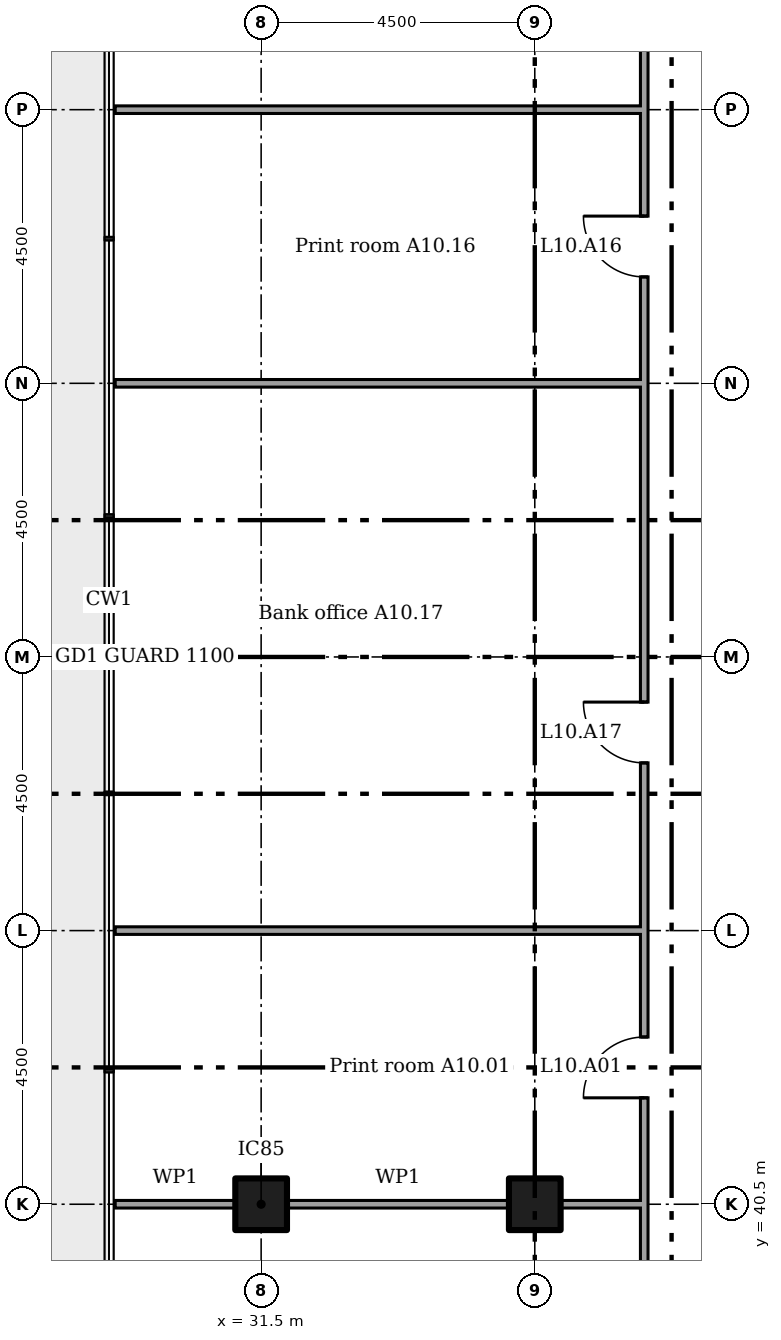
"""IFC4 building model, lengths in metres.
Left out: names, types, materials, properties, quantities, classifications, styles, units other than length and angle.
Written with IfcOpenShell. Run it as: python <this file> out.ifc"""

import sys

from ifc_helpers import new_model, si_unit, direction, frame, frame_2d, origin, origin_2d, place, context, subcontext, project, spatial, rectangle, extrude, element, fill, save


model = new_model("IFC4")
c1 = context("Model", 3, precision=1e-05, world=origin(), true_north=direction((0.0, 1.0)))
c2 = subcontext(c1, "Body", "Model", "MODEL_VIEW")
j1 = project(units=[si_unit("LENGTHUNIT", "METRE"), si_unit("PLANEANGLEUNIT", "RADIAN")], contexts=[c1])
p1 = place(None, origin())
s1 = spatial("IfcSite", under=j1, at=p1, CompositionType="ELEMENT")
p2 = place(p1, origin())
s2 = spatial("IfcBuilding", under=s1, at=p2, CompositionType="ELEMENT")
p3 = place(p2, frame((0.0, 0.0, 47.4)))
s3 = spatial("IfcBuildingStorey", under=s2, at=p3, CompositionType="ELEMENT", Elevation=47.4)
for number, where in (
    (1, (31.5, 40.5, 0.0)),
    (2, (36.0, 40.5, 0.0)),
):
    element("IfcColumn", number, at=place(p3, frame(where)), inside=s3, PredefinedType="COLUMN", context=c2, shape_type="SweptSolid", body=[
        extrude(rectangle(XDim=0.85, YDim=0.85, at=origin_2d()), origin(), (0.0, 0.0, 1.0), 3.6),
    ])
p4 = place(p3, frame((29.1, 40.5, 0.0)))
e3 = element("IfcWall", 3, at=p4, inside=s3, PredefinedType="PARTITIONING", context=c2, shape_type="SweptSolid", body=[
    extrude(rectangle(XDim=1.975, YDim=0.125, at=frame_2d((0.987, 0.0))), origin(), (0.0, 0.0, 1.0), 2.676),
])
p5 = place(p3, frame((31.925, 40.5, 0.0)))
e4 = element("IfcWall", 4, at=p5, inside=s3, PredefinedType="PARTITIONING", context=c2, shape_type="SweptSolid", body=[
    extrude(rectangle(XDim=3.65, YDim=0.125, at=frame_2d((1.825, 0.0))), origin(), (0.0, 0.0, 1.0), 2.676),
])
p6 = place(p3, frame((36.425, 40.5, 0.0)))
e5 = element("IfcWall", 5, at=p6, inside=s3, PredefinedType="PARTITIONING", context=c2, shape_type="SweptSolid", body=[
    extrude(rectangle(XDim=1.375, YDim=0.125, at=frame_2d((0.688, 0.0))), origin(), (0.0, 0.0, 1.0), 2.676),
])
for number, where in (
    (6, (29.1, 45.0, 0.0)),
    (7, (29.1, 54.0, 0.0)),
    (8, (29.1, 58.5, 0.0)),
):
    element("IfcWall", number, at=place(p3, frame(where)), inside=s3, PredefinedType="PARTITIONING", context=c2, shape_type="SweptSolid", body=[
        extrude(rectangle(XDim=8.7, YDim=0.125, at=frame_2d((4.35, 0.0))), origin(), (0.0, 0.0, 1.0), 2.766),
    ])
p7 = place(p3, frame((37.8, 38.462, 0.0), z_axis=(0.0, 0.0, 1.0), x_axis=(0.0, 1.0, 0.0)))
e9 = element("IfcWall", 9, at=p7, inside=s3, PredefinedType="PARTITIONING", context=c2, shape_type="SweptSolid", body=[
    extrude(rectangle(XDim=22.075, YDim=0.125, at=frame_2d((11.038, 0.0))), origin(), (0.0, 0.0, 1.0), 3.45),
])
p8 = place(p7, frame((3.788, 0.0, 0.0)))
e10 = element("IfcOpeningElement", 10, at=p8, cuts=e9, PredefinedType="OPENING", context=c2, shape_type="SweptSolid", body=[
    extrude(rectangle(XDim=1.0, YDim=2.1, at=frame_2d((0.5, 1.05))), frame((0.0, 0.073, 0.0), z_axis=(0.0, -1.0, 0.0), x_axis=(1.0, 0.0, 0.0)), (0.0, 0.0, 1.0), 0.145),
])
p9 = place(p7, frame((17.288, 0.0, 0.0)))
e11 = element("IfcOpeningElement", 11, at=p9, cuts=e9, PredefinedType="OPENING", context=c2, shape_type="SweptSolid", body=[
    extrude(rectangle(XDim=1.0, YDim=2.1, at=frame_2d((0.5, 1.05))), frame((0.0, 0.073, 0.0), z_axis=(0.0, -1.0, 0.0), x_axis=(1.0, 0.0, 0.0)), (0.0, 0.0, 1.0), 0.145),
])
p10 = place(p7, frame((9.295, 0.0, 0.0)))
e12 = element("IfcOpeningElement", 12, at=p10, cuts=e9, PredefinedType="OPENING", context=c2, shape_type="SweptSolid", body=[
    extrude(rectangle(XDim=1.0, YDim=2.1, at=frame_2d((0.5, 1.05))), frame((0.0, 0.073, 0.0), z_axis=(0.0, -1.0, 0.0), x_axis=(1.0, 0.0, 0.0)), (0.0, 0.0, 1.0), 0.145),
])
p11 = place(p8, origin())
e13 = element("IfcDoor", 13, at=p11, inside=s3, OperationType="SINGLE_SWING_RIGHT", PredefinedType="DOOR", context=c2, shape_type="SweptSolid", body=[
    extrude(rectangle(XDim=1.0, YDim=2.1, at=frame_2d((0.5, 1.05))), frame((0.0, 0.025, 0.0), z_axis=(0.0, -1.0, 0.0), x_axis=(1.0, 0.0, 0.0)), (0.0, 0.0, 1.0), 0.05),
])
fill(e10, e13)
p12 = place(p9, origin())
e14 = element("IfcDoor", 14, at=p12, inside=s3, OperationType="SINGLE_SWING_LEFT", PredefinedType="DOOR", context=c2, shape_type="SweptSolid", body=[
    extrude(rectangle(XDim=1.0, YDim=2.1, at=frame_2d((0.5, 1.05))), frame((0.0, 0.025, 0.0), z_axis=(0.0, -1.0, 0.0), x_axis=(1.0, 0.0, 0.0)), (0.0, 0.0, 1.0), 0.05),
])
fill(e11, e14)
p13 = place(p10, origin())
e15 = element("IfcDoor", 15, at=p13, inside=s3, OperationType="SINGLE_SWING_LEFT", PredefinedType="DOOR", context=c2, shape_type="SweptSolid", body=[
    extrude(rectangle(XDim=1.0, YDim=2.1, at=frame_2d((0.5, 1.05))), frame((0.0, 0.025, 0.0), z_axis=(0.0, -1.0, 0.0), x_axis=(1.0, 0.0, 0.0)), (0.0, 0.0, 1.0), 0.05),
])
fill(e12, e15)
save(model, sys.argv[1])
